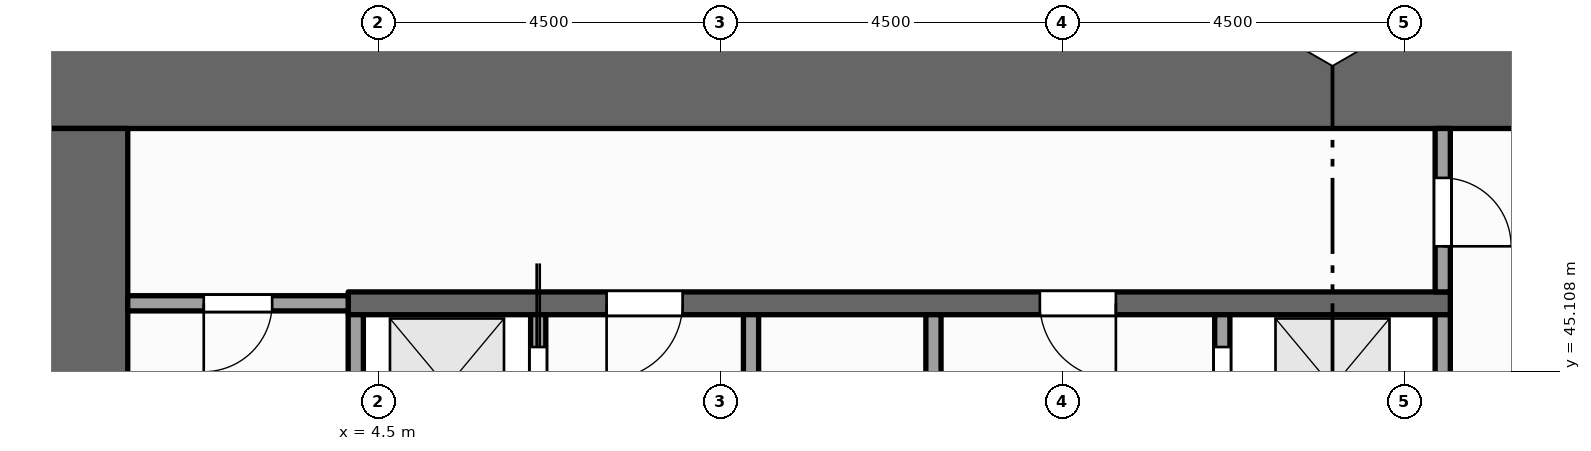
"""IFC4 building model, lengths in metres.
Left out: names, types, materials, properties, quantities, classifications, styles, units other than length and angle.
Written with IfcOpenShell. Run it as: python <this file> out.ifc"""

import sys

from ifc_helpers import new_model, si_unit, direction, frame, frame_2d, origin, place, context, subcontext, project, spatial, rectangle, extrude, element, fill, save


model = new_model("IFC4")
c1 = context("Model", 3, precision=1e-05, world=origin(), true_north=direction((0.0, 1.0)))
c2 = subcontext(c1, "Body", "Model", "MODEL_VIEW")
j1 = project(units=[si_unit("LENGTHUNIT", "METRE"), si_unit("PLANEANGLEUNIT", "RADIAN")], contexts=[c1])
p1 = place(None, origin())
s1 = spatial("IfcSite", under=j1, at=p1, CompositionType="ELEMENT")
p2 = place(p1, origin())
s2 = spatial("IfcBuilding", under=s1, at=p2, CompositionType="ELEMENT")
p3 = place(p2, frame((0.0, 0.0, 107.0)))
s3 = spatial("IfcBuildingStorey", under=s2, at=p3, CompositionType="ELEMENT", Elevation=107.0)
p4 = place(p3, frame((0.0, 48.9, -0.15), z_axis=(0.0, 0.0, 1.0), x_axis=(1.0, 0.0, 0.0)))
e1 = element("IfcWall", 1, at=p4, inside=s3, PredefinedType="SHEAR", context=c2, shape_type="SweptSolid", body=[
    extrude(rectangle(XDim=22.5, YDim=1.2, at=frame_2d((11.25, 0.0))), origin(), (0.0, 0.0, 1.0), 4.0),
])
p5 = place(p3, frame((0.6, 37.2, -0.15), z_axis=(0.0, 0.0, 1.0), x_axis=(0.0, 1.0, 0.0)))
e2 = element("IfcWall", 2, at=p5, inside=s3, PredefinedType="SHEAR", context=c2, shape_type="SweptSolid", body=[
    extrude(rectangle(XDim=11.1, YDim=1.2, at=frame_2d((5.55, 0.0))), origin(), (0.0, 0.0, 1.0), 4.0),
])
p6 = place(p3, frame((4.2, 43.525, 0.0), z_axis=(0.0, 0.0, 1.0), x_axis=(0.0, 1.0, 0.0)))
e3 = element("IfcWall", 3, at=p6, inside=s3, PredefinedType="SOLIDWALL", context=c2, shape_type="SweptSolid", body=[
    extrude(rectangle(XDim=2.325, YDim=0.2, at=frame_2d((1.163, 0.0))), origin(), (0.0, 0.0, 1.0), 3.85),
])
p7 = place(p3, frame((6.6, 37.2, 0.0), z_axis=(0.0, 0.0, 1.0), x_axis=(0.0, 1.0, 0.0)))
e4 = element("IfcWall", 4, at=p7, inside=s3, PredefinedType="SOLIDWALL", context=c2, shape_type="SweptSolid", body=[
    extrude(rectangle(XDim=8.65, YDim=0.2, at=frame_2d((4.325, 0.0))), origin(), (0.0, 0.0, 1.0), 3.85),
])
p8 = place(p7, frame((0.5, 0.0, 0.012)))
e5 = element("IfcOpeningElement", 5, at=p8, cuts=e4, PredefinedType="OPENING", context=c2, shape_type="SweptSolid", body=[
    extrude(rectangle(XDim=1.1, YDim=2.1, at=frame_2d((0.55, 1.05))), frame((0.0, 0.11, 0.0), z_axis=(0.0, -1.0, 0.0), x_axis=(1.0, 0.0, 0.0)), (0.0, 0.0, 1.0), 0.22),
])
p9 = place(p7, frame((2.75, 0.0, 0.012)))
e6 = element("IfcOpeningElement", 6, at=p9, cuts=e4, PredefinedType="OPENING", context=c2, shape_type="SweptSolid", body=[
    extrude(rectangle(XDim=1.1, YDim=2.1, at=frame_2d((0.55, 1.05))), frame((0.0, 0.11, 0.0), z_axis=(0.0, -1.0, 0.0), x_axis=(1.0, 0.0, 0.0)), (0.0, 0.0, 1.0), 0.22),
])
p10 = place(p7, frame((4.95, 0.0, 0.012)))
e7 = element("IfcOpeningElement", 7, at=p10, cuts=e4, PredefinedType="OPENING", context=c2, shape_type="SweptSolid", body=[
    extrude(rectangle(XDim=1.1, YDim=2.1, at=frame_2d((0.55, 1.05))), frame((0.0, 0.11, 0.0), z_axis=(0.0, -1.0, 0.0), x_axis=(1.0, 0.0, 0.0)), (0.0, 0.0, 1.0), 0.22),
])
p11 = place(p7, frame((7.125, 0.0, 0.012)))
e8 = element("IfcOpeningElement", 8, at=p11, cuts=e4, PredefinedType="OPENING", context=c2, shape_type="SweptSolid", body=[
    extrude(rectangle(XDim=1.1, YDim=2.1, at=frame_2d((0.55, 1.05))), frame((0.0, 0.11, 0.0), z_axis=(0.0, -1.0, 0.0), x_axis=(1.0, 0.0, 0.0)), (0.0, 0.0, 1.0), 0.22),
])
p12 = place(p3, frame((9.4, 37.2, 0.0), z_axis=(0.0, 0.0, 1.0), x_axis=(0.0, 1.0, 0.0)))
e9 = element("IfcWall", 9, at=p12, inside=s3, PredefinedType="PARTITIONING", context=c2, shape_type="SweptSolid", body=[
    extrude(rectangle(XDim=8.65, YDim=0.2, at=frame_2d((4.325, 0.0))), origin(), (0.0, 0.0, 1.0), 3.85),
])
p13 = place(p12, frame((3.875, 0.0, 0.0)))
e10 = element("IfcOpeningElement", 10, at=p13, cuts=e9, PredefinedType="OPENING", context=c2, shape_type="SweptSolid", body=[
    extrude(rectangle(XDim=0.9, YDim=2.1, at=frame_2d((0.45, 1.05))), frame((0.0, 0.11, 0.0), z_axis=(0.0, -1.0, 0.0), x_axis=(1.0, 0.0, 0.0)), (0.0, 0.0, 1.0), 0.22),
])
p14 = place(p3, frame((11.8, 37.2, 0.0), z_axis=(0.0, 0.0, 1.0), x_axis=(0.0, 1.0, 0.0)))
e11 = element("IfcWall", 11, at=p14, inside=s3, PredefinedType="PARTITIONING", context=c2, shape_type="SweptSolid", body=[
    extrude(rectangle(XDim=8.65, YDim=0.2, at=frame_2d((4.325, 0.0))), origin(), (0.0, 0.0, 1.0), 3.85),
])
p15 = place(p3, frame((15.6, 43.7, 0.0), z_axis=(0.0, 0.0, 1.0), x_axis=(0.0, 1.0, 0.0)))
e12 = element("IfcWall", 12, at=p15, inside=s3, PredefinedType="SOLIDWALL", context=c2, shape_type="SweptSolid", body=[
    extrude(rectangle(XDim=2.15, YDim=0.2, at=frame_2d((1.075, 0.0))), origin(), (0.0, 0.0, 1.0), 3.85),
])
p16 = place(p15, frame((0.625, 0.0, 0.012)))
e13 = element("IfcOpeningElement", 13, at=p16, cuts=e12, PredefinedType="OPENING", context=c2, shape_type="SweptSolid", body=[
    extrude(rectangle(XDim=1.1, YDim=2.1, at=frame_2d((0.55, 1.05))), frame((0.0, 0.11, 0.0), z_axis=(0.0, -1.0, 0.0), x_axis=(1.0, 0.0, 0.0)), (0.0, 0.0, 1.0), 0.22),
])
p17 = place(p3, frame((18.5, 43.7, 0.0), z_axis=(0.0, 0.0, 1.0), x_axis=(0.0, 1.0, 0.0)))
e14 = element("IfcWall", 14, at=p17, inside=s3, PredefinedType="SOLIDWALL", context=c2, shape_type="SweptSolid", body=[
    extrude(rectangle(XDim=2.15, YDim=0.2, at=frame_2d((1.075, 0.0))), origin(), (0.0, 0.0, 1.0), 3.85),
])
p18 = place(p3, frame((18.5, 46.15, 0.0), z_axis=(0.0, 0.0, 1.0), x_axis=(0.0, 1.0, 0.0)))
e15 = element("IfcWall", 15, at=p18, inside=s3, PredefinedType="PARTITIONING", context=c2, shape_type="SweptSolid", body=[
    extrude(rectangle(XDim=2.15, YDim=0.2, at=frame_2d((1.075, 0.0))), origin(), (0.0, 0.0, 1.0), 3.85),
])
p19 = place(p18, frame((0.6, 0.0, 0.0)))
e16 = element("IfcOpeningElement", 16, at=p19, cuts=e15, PredefinedType="OPENING", context=c2, shape_type="SweptSolid", body=[
    extrude(rectangle(XDim=0.9, YDim=2.1, at=frame_2d((0.45, 1.05))), frame((0.0, 0.11, 0.0), z_axis=(0.0, -1.0, 0.0), x_axis=(1.0, 0.0, 0.0)), (0.0, 0.0, 1.0), 0.22),
])
p20 = place(p3, frame((1.2, 46.0, 0.0), z_axis=(0.0, 0.0, 1.0), x_axis=(1.0, 0.0, 0.0)))
e17 = element("IfcWall", 17, at=p20, inside=s3, PredefinedType="PARTITIONING", context=c2, shape_type="SweptSolid", body=[
    extrude(rectangle(XDim=2.9, YDim=0.2, at=frame_2d((1.45, 0.0))), origin(), (0.0, 0.0, 1.0), 3.85),
])
p21 = place(p20, frame((1.0, 0.0, 0.0)))
e18 = element("IfcOpeningElement", 18, at=p21, cuts=e17, PredefinedType="OPENING", context=c2, shape_type="SweptSolid", body=[
    extrude(rectangle(XDim=0.9, YDim=2.1, at=frame_2d((0.45, 1.05))), frame((0.0, 0.11, 0.0), z_axis=(0.0, -1.0, 0.0), x_axis=(1.0, 0.0, 0.0)), (0.0, 0.0, 1.0), 0.22),
])
p22 = place(p3, frame((4.1, 46.0, 0.0), z_axis=(0.0, 0.0, 1.0), x_axis=(1.0, 0.0, 0.0)))
e19 = element("IfcWall", 19, at=p22, inside=s3, PredefinedType="SHEAR", context=c2, shape_type="SweptSolid", body=[
    extrude(rectangle(XDim=14.5, YDim=0.3, at=frame_2d((7.25, 0.0))), origin(), (0.0, 0.0, 1.0), 3.85),
])
p23 = place(p22, frame((3.4, 0.0, 0.0)))
e20 = element("IfcOpeningElement", 20, at=p23, cuts=e19, PredefinedType="OPENING", context=c2, shape_type="SweptSolid", body=[
    extrude(rectangle(XDim=1.0, YDim=2.1, at=frame_2d((0.5, 1.05))), frame((0.0, 0.16, 0.0), z_axis=(0.0, -1.0, 0.0), x_axis=(1.0, 0.0, 0.0)), (0.0, 0.0, 1.0), 0.32),
])
p24 = place(p22, frame((9.1, 0.0, 0.0)))
e21 = element("IfcOpeningElement", 21, at=p24, cuts=e19, PredefinedType="OPENING", context=c2, shape_type="SweptSolid", body=[
    extrude(rectangle(XDim=1.0, YDim=2.1, at=frame_2d((0.5, 1.05))), frame((0.0, 0.16, 0.0), z_axis=(0.0, -1.0, 0.0), x_axis=(1.0, 0.0, 0.0)), (0.0, 0.0, 1.0), 0.32),
])
p25 = place(p11, origin())
e22 = element("IfcDoor", 22, at=p25, inside=s3, OperationType="SLIDING_TO_RIGHT", PredefinedType="DOOR", context=c2, shape_type="SweptSolid", body=[
    extrude(rectangle(XDim=1.1, YDim=2.1, at=frame_2d((0.55, 1.05))), frame((0.0, 0.025, 0.0), z_axis=(0.0, -1.0, 0.0), x_axis=(1.0, 0.0, 0.0)), (0.0, 0.0, 1.0), 0.05),
])
fill(e8, e22)
p26 = place(p16, origin())
e23 = element("IfcDoor", 23, at=p26, inside=s3, OperationType="SLIDING_TO_LEFT", PredefinedType="DOOR", context=c2, shape_type="SweptSolid", body=[
    extrude(rectangle(XDim=1.1, YDim=2.1, at=frame_2d((0.55, 1.05))), frame((0.0, 0.025, 0.0), z_axis=(0.0, -1.0, 0.0), x_axis=(1.0, 0.0, 0.0)), (0.0, 0.0, 1.0), 0.05),
])
fill(e13, e23)
p27 = place(p23, origin())
e24 = element("IfcDoor", 24, at=p27, inside=s3, OperationType="SINGLE_SWING_LEFT", PredefinedType="DOOR", context=c2, shape_type="SweptSolid", body=[
    extrude(rectangle(XDim=1.0, YDim=2.1, at=frame_2d((0.5, 1.05))), frame((0.0, 0.025, 0.0), z_axis=(0.0, -1.0, 0.0), x_axis=(1.0, 0.0, 0.0)), (0.0, 0.0, 1.0), 0.05),
])
fill(e20, e24)
p28 = place(p24, origin())
e25 = element("IfcDoor", 25, at=p28, inside=s3, OperationType="SINGLE_SWING_RIGHT", PredefinedType="DOOR", context=c2, shape_type="SweptSolid", body=[
    extrude(rectangle(XDim=1.0, YDim=2.1, at=frame_2d((0.5, 1.05))), frame((0.0, 0.025, 0.0), z_axis=(0.0, -1.0, 0.0), x_axis=(1.0, 0.0, 0.0)), (0.0, 0.0, 1.0), 0.05),
])
fill(e21, e25)
p29 = place(p21, origin())
e26 = element("IfcDoor", 26, at=p29, inside=s3, OperationType="SINGLE_SWING_LEFT", PredefinedType="DOOR", context=c2, shape_type="SweptSolid", body=[
    extrude(rectangle(XDim=0.9, YDim=2.1, at=frame_2d((0.45, 1.05))), frame((0.0, 0.025, 0.0), z_axis=(0.0, -1.0, 0.0), x_axis=(1.0, 0.0, 0.0)), (0.0, 0.0, 1.0), 0.05),
])
fill(e18, e26)
p30 = place(p19, origin())
e27 = element("IfcDoor", 27, at=p30, inside=s3, OperationType="SINGLE_SWING_LEFT", PredefinedType="DOOR", context=c2, shape_type="SweptSolid", body=[
    extrude(rectangle(XDim=0.9, YDim=2.1, at=frame_2d((0.45, 1.05))), frame((0.0, 0.025, 0.0), z_axis=(0.0, -1.0, 0.0), x_axis=(1.0, 0.0, 0.0)), (0.0, 0.0, 1.0), 0.05),
])
fill(e16, e27)
save(model, sys.argv[1])
